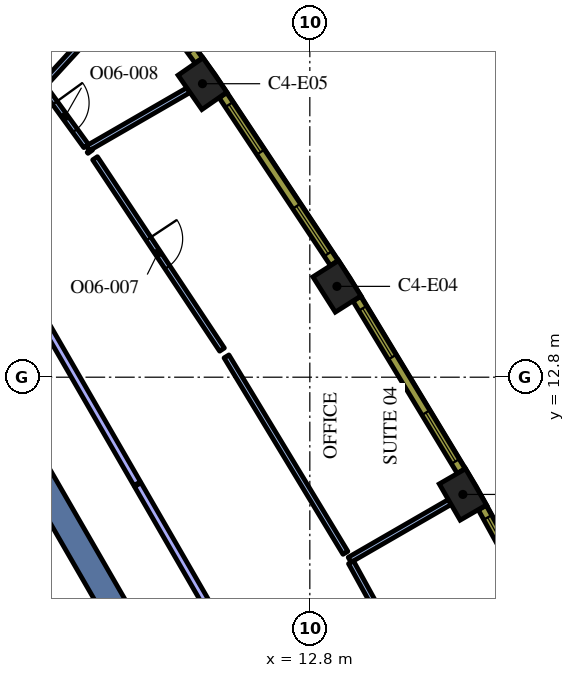
"""IFC4 building model, lengths in metres.
Left out: names, types, materials, properties, quantities, classifications, styles, units other than length and angle.
Written with IfcOpenShell. Run it as: python <this file> out.ifc"""

import sys

from ifc_helpers import new_model, si_unit, direction, frame, frame_2d, origin, origin_2d, place, context, subcontext, project, spatial, polyline, rectangle, outline, extrude, element, fill, save


model = new_model("IFC4")
c1 = context("Model", 3, precision=1e-05, world=origin(), true_north=direction((0.0, 1.0)))
c2 = subcontext(c1, "Body", "Model", "MODEL_VIEW")
j1 = project(units=[si_unit("LENGTHUNIT", "METRE"), si_unit("PLANEANGLEUNIT", "RADIAN")], contexts=[c1])
p1 = place(None, origin())
s1 = spatial("IfcSite", under=j1, at=p1, CompositionType="ELEMENT")
p2 = place(p1, origin())
s2 = spatial("IfcBuilding", under=s1, at=p2, CompositionType="ELEMENT")
p3 = place(p2, frame((0.0, 0.0, 205.8)))
s3 = spatial("IfcBuildingStorey", under=s2, at=p3, CompositionType="ELEMENT", Elevation=205.8)
for number, where, z_axis, x_axis in (
    (1, (16.827, 9.715, 0.0), (0.0, 0.0, 1.0), (-0.5, 0.866, 0.0)),
    (2, (13.513, 15.19, 0.0), (0.0, 0.0, 1.0), (-0.536, 0.845, 0.0)),
    (3, (9.975, 20.522, 0.0), (0.0, 0.0, 1.0), (-0.57, 0.822, 0.0)),
):
    element("IfcColumn", number, at=place(p3, frame(where, z_axis=z_axis, x_axis=x_axis)), inside=s3, PredefinedType="COLUMN", context=c2, shape_type="SweptSolid", body=[
        extrude(rectangle(XDim=1.1, YDim=0.8, at=origin_2d()), origin(), (0.0, 0.0, 1.0), 4.2),
    ])
p4 = place(p3, frame((8.235, 5.736, 0.0), z_axis=(0.0, 0.0, 1.0), x_axis=(-0.499983401189, 0.8660349869, 0.0)))
e4 = element("IfcWall", 4, at=p4, inside=s3, PredefinedType="SOLIDWALL", context=c2, shape_type="SweptSolid", body=[
    extrude(rectangle(XDim=12.472, YDim=0.7, at=frame_2d((6.236, 0.0))), origin(), (0.0, 0.0, 1.0), 4.2),
])
p5 = place(p3, origin())
e5 = element("IfcWall", 5, at=p5, inside=s3, PredefinedType="SOLIDWALL", context=c2, shape_type="SweptSolid", body=[
    extrude(outline(polyline([(0.332, 6.925), (0.335, 6.925), (0.335, 6.925), (0.335, 6.925), (0.335, 7.075), (0.335, 7.075), (0.335, 7.075), (0.245, 7.075), (0.035, 7.439), (0.252, 7.564), (0.377, 7.348), (1.512, 5.382), (1.637, 5.165), (2.221, 4.153), (2.771, 3.199), (2.896, 2.983), (3.138, 2.564), (4.031, 1.017), (4.156, 0.801), (5.292, -1.165), (5.417, -1.382), (6.073, -2.519), (6.552, -3.348), (6.677, -3.564), (6.46, -3.689), (0.332, 6.925)])), origin(), (0.0, 0.0, 1.0), 4.2),
])
p6 = place(p3, frame((8.565, -2.185, 0.0), z_axis=(0.0, 0.0, 1.0), x_axis=(-0.499997954832, 0.866026584559, 0.0)))
e6 = element("IfcWall", 6, at=p6, inside=s3, PredefinedType="SOLIDWALL", context=c2, shape_type="SweptSolid", body=[
    extrude(rectangle(XDim=12.35, YDim=0.25, at=frame_2d((6.175, 0.0))), origin(), (0.0, 0.0, 1.0), 4.2),
])
p7 = place(p6, frame((0.585, 0.0, 0.0)))
e7 = element("IfcOpeningElement", 7, at=p7, cuts=e6, PredefinedType="OPENING", context=c2, shape_type="SweptSolid", body=[
    extrude(rectangle(XDim=1.1, YDim=2.1, at=frame_2d((0.55, 1.05))), frame((0.0, 0.135, 0.0), z_axis=(0.0, -1.0, 0.0), x_axis=(1.0, 0.0, 0.0)), (0.0, 0.0, 1.0), 0.27),
])
p8 = place(p3, frame((13.848, 7.995, 0.0), z_axis=(0.0, 0.0, 1.0), x_axis=(0.86603583403, 0.49998193385, 0.0)))
e8 = element("IfcWall", 8, at=p8, inside=s3, PredefinedType="PARTITIONING", context=c2, shape_type="SweptSolid", body=[
    extrude(rectangle(XDim=3.041, YDim=0.15, at=frame_2d((1.52, 0.0))), origin(), (0.0, 0.0, 1.0), 3.45),
])
p9 = place(p3, frame((16.76, 2.7, 0.0), z_axis=(0.0, 0.0, 1.0), x_axis=(-0.481907755985, 0.876221955169, 0.0)))
e9 = element("IfcWall", 9, at=p9, inside=s3, PredefinedType="PARTITIONING", context=c2, shape_type="SweptSolid", body=[
    extrude(rectangle(XDim=5.967, YDim=0.15, at=frame_2d((2.984, 0.0))), origin(), (0.0, 0.0, 1.0), 3.45),
])
p10 = place(p3, frame((6.958, 18.823, 0.0), z_axis=(0.0, 0.0, 1.0), x_axis=(0.866008752819, 0.500028839209, 0.0)))
e10 = element("IfcWall", 10, at=p10, inside=s3, PredefinedType="PARTITIONING", context=c2, shape_type="SweptSolid", body=[
    extrude(rectangle(XDim=3.058, YDim=0.15, at=frame_2d((1.529, 0.0))), origin(), (0.0, 0.0, 1.0), 3.45),
])
p11 = place(p3, frame((13.737, 8.178, 0.0), z_axis=(0.0, 0.0, 1.0), x_axis=(-0.517884383874, 0.855450620983, 0.0)))
e11 = element("IfcWall", 11, at=p11, inside=s3, PredefinedType="PARTITIONING", context=c2, shape_type="SweptSolid", body=[
    extrude(rectangle(XDim=6.043, YDim=0.15, at=frame_2d((3.021, 0.0))), origin(), (0.0, 0.0, 1.0), 3.45),
])
p12 = place(p3, frame((7.148, 18.561, 0.0), z_axis=(0.0, 0.0, 1.0), x_axis=(0.552890023891, -0.833254235802, 0.0)))
e12 = element("IfcWall", 12, at=p12, inside=s3, PredefinedType="PARTITIONING", context=c2, shape_type="SweptSolid", body=[
    extrude(rectangle(XDim=6.042, YDim=0.15, at=frame_2d((3.021, 0.0))), origin(), (0.0, 0.0, 1.0), 3.45),
])
p13 = place(p12, frame((2.542, 0.0, 0.0)))
e13 = element("IfcOpeningElement", 13, at=p13, cuts=e12, PredefinedType="OPENING", context=c2, shape_type="SweptSolid", body=[
    extrude(rectangle(XDim=0.9, YDim=2.1, at=frame_2d((0.45, 1.05))), frame((0.0, 0.085, 0.0), z_axis=(0.0, -1.0, 0.0), x_axis=(1.0, 0.0, 0.0)), (0.0, 0.0, 1.0), 0.17),
])
p14 = place(p3, frame((7.022, 18.734, 0.0), z_axis=(0.0, 0.0, 1.0), x_axis=(-0.585233084123, 0.810865116556, 0.0)))
e14 = element("IfcWall", 14, at=p14, inside=s3, PredefinedType="PARTITIONING", context=c2, shape_type="SweptSolid", body=[
    extrude(rectangle(XDim=0.035, YDim=0.15, at=frame_2d((0.017, 0.0))), origin(), (0.0, 0.0, 1.0), 3.45),
])
p15 = place(p3, frame((5.764, 20.469, 0.0), z_axis=(0.0, 0.0, 1.0), x_axis=(0.586969615341, -0.809608961577, 0.0)))
e15 = element("IfcWall", 15, at=p15, inside=s3, PredefinedType="PARTITIONING", context=c2, shape_type="SweptSolid", body=[
    extrude(rectangle(XDim=1.957, YDim=0.15, at=frame_2d((0.979, 0.0))), origin(), (0.0, 0.0, 1.0), 3.45),
])
p16 = place(p15, frame((0.558, 0.0, 0.0)))
e16 = element("IfcOpeningElement", 16, at=p16, cuts=e15, PredefinedType="OPENING", context=c2, shape_type="SweptSolid", body=[
    extrude(rectangle(XDim=0.9, YDim=2.1, at=frame_2d((0.45, 1.05))), frame((0.0, 0.085, 0.0), z_axis=(0.0, -1.0, 0.0), x_axis=(1.0, 0.0, 0.0)), (0.0, 0.0, 1.0), 0.17),
])
p17 = place(p3, frame((5.816, 20.526, 0.0), z_axis=(0.0, 0.0, 1.0), x_axis=(0.675700046709, 0.737176672771, 0.0)))
e17 = element("IfcWall", 17, at=p17, inside=s3, PredefinedType="PARTITIONING", context=c2, shape_type="SweptSolid", body=[
    extrude(rectangle(XDim=3.598, YDim=0.15, at=frame_2d((1.799, 0.0))), origin(), (0.0, 0.0, 1.0), 3.45),
])
p18 = place(p3, frame((12.772, 2.178, 0.0), z_axis=(0.0, 0.0, 1.0), x_axis=(-0.5000018851, 0.866024315419, 0.0)))
e18 = element("IfcWall", 18, at=p18, inside=s3, PredefinedType="PARTITIONING", context=c2, shape_type="SweptSolid", body=[
    extrude(rectangle(XDim=9.0, YDim=0.2, at=frame_2d((4.5, 0.0))), origin(), (0.0, 0.0, 1.0), 3.45),
])
p19 = place(p3, frame((8.257, 9.998, 0.0), z_axis=(0.0, 0.0, 1.0), x_axis=(-0.499998405424, 0.866026324412, 0.0)))
e19 = element("IfcWall", 19, at=p19, inside=s3, PredefinedType="PARTITIONING", context=c2, shape_type="SweptSolid", body=[
    extrude(rectangle(XDim=9.267, YDim=0.2, at=frame_2d((4.633, 0.0))), origin(), (0.0, 0.0, 1.0), 3.45),
])
p20 = place(p3, frame((19.892, 4.725, 0.0), z_axis=(0.0, 0.0, 1.0), x_axis=(-0.481925825015, 0.876212017256, 0.0)))
e20 = element("IfcWall", 20, at=p20, inside=s3, PredefinedType="SOLIDWALL", context=c2, shape_type="SweptSolid", body=[
    extrude(rectangle(XDim=5.299, YDim=0.24, at=frame_2d((2.649, 0.0))), origin(), (0.0, 0.0, 1.0), 3.95),
])
p21 = place(p20, frame((0.295, 0.0, 0.9)))
e21 = element("IfcOpeningElement", 21, at=p21, cuts=e20, PredefinedType="OPENING", context=c2, shape_type="SweptSolid", body=[
    extrude(rectangle(XDim=1.5, YDim=2.55, at=frame_2d((0.75, 1.275))), frame((0.0, 0.13, 0.0), z_axis=(0.0, -1.0, 0.0), x_axis=(1.0, 0.0, 0.0)), (0.0, 0.0, 1.0), 0.26),
])
p22 = place(p20, frame((3.504, 0.0, 0.9)))
e22 = element("IfcOpeningElement", 22, at=p22, cuts=e20, PredefinedType="OPENING", context=c2, shape_type="SweptSolid", body=[
    extrude(rectangle(XDim=1.5, YDim=2.55, at=frame_2d((0.75, 1.275))), frame((0.0, 0.13, 0.0), z_axis=(0.0, -1.0, 0.0), x_axis=(1.0, 0.0, 0.0)), (0.0, 0.0, 1.0), 0.26),
])
p23 = place(p3, frame((16.782, 10.331, 0.0), z_axis=(0.0, 0.0, 1.0), x_axis=(-0.517846166225, 0.855473756538, 0.0)))
e23 = element("IfcWall", 23, at=p23, inside=s3, PredefinedType="SOLIDWALL", context=c2, shape_type="SweptSolid", body=[
    extrude(rectangle(XDim=5.298, YDim=0.24, at=frame_2d((2.649, 0.0))), origin(), (0.0, 0.0, 1.0), 3.95),
])
p24 = place(p23, frame((0.294, 0.0, 0.9)))
e24 = element("IfcOpeningElement", 24, at=p24, cuts=e23, PredefinedType="OPENING", context=c2, shape_type="SweptSolid", body=[
    extrude(rectangle(XDim=1.5, YDim=2.55, at=frame_2d((0.75, 1.275))), frame((0.0, 0.13, 0.0), z_axis=(0.0, -1.0, 0.0), x_axis=(1.0, 0.0, 0.0)), (0.0, 0.0, 1.0), 0.26),
])
p25 = place(p23, frame((3.504, 0.0, 0.9)))
e25 = element("IfcOpeningElement", 25, at=p25, cuts=e23, PredefinedType="OPENING", context=c2, shape_type="SweptSolid", body=[
    extrude(rectangle(XDim=1.5, YDim=2.55, at=frame_2d((0.75, 1.275))), frame((0.0, 0.13, 0.0), z_axis=(0.0, -1.0, 0.0), x_axis=(1.0, 0.0, 0.0)), (0.0, 0.0, 1.0), 0.26),
])
p26 = place(p3, frame((13.442, 15.803, 0.0), z_axis=(0.0, 0.0, 1.0), x_axis=(-0.552901821755, 0.833246407433, 0.0)))
e26 = element("IfcWall", 26, at=p26, inside=s3, PredefinedType="SOLIDWALL", context=c2, shape_type="SweptSolid", body=[
    extrude(rectangle(XDim=5.298, YDim=0.24, at=frame_2d((2.649, 0.0))), origin(), (0.0, 0.0, 1.0), 3.95),
])
p27 = place(p26, frame((0.295, 0.0, 0.9)))
e27 = element("IfcOpeningElement", 27, at=p27, cuts=e26, PredefinedType="OPENING", context=c2, shape_type="SweptSolid", body=[
    extrude(rectangle(XDim=1.5, YDim=2.55, at=frame_2d((0.75, 1.275))), frame((0.0, 0.13, 0.0), z_axis=(0.0, -1.0, 0.0), x_axis=(1.0, 0.0, 0.0)), (0.0, 0.0, 1.0), 0.26),
])
p28 = place(p26, frame((3.504, 0.0, 0.9)))
e28 = element("IfcOpeningElement", 28, at=p28, cuts=e26, PredefinedType="OPENING", context=c2, shape_type="SweptSolid", body=[
    extrude(rectangle(XDim=1.5, YDim=2.55, at=frame_2d((0.75, 1.275))), frame((0.0, 0.13, 0.0), z_axis=(0.0, -1.0, 0.0), x_axis=(1.0, 0.0, 0.0)), (0.0, 0.0, 1.0), 0.26),
])
p29 = place(p3, frame((9.878, 21.132, 0.0), z_axis=(0.0, 0.0, 1.0), x_axis=(-0.586998456641, 0.80958805074, 0.0)))
e29 = element("IfcWall", 29, at=p29, inside=s3, PredefinedType="SOLIDWALL", context=c2, shape_type="SweptSolid", body=[
    extrude(rectangle(XDim=5.311, YDim=0.24, at=frame_2d((2.655, 0.0))), origin(), (0.0, 0.0, 1.0), 3.95),
])
p30 = place(p29, frame((0.306, 0.0, 0.9)))
e30 = element("IfcOpeningElement", 30, at=p30, cuts=e29, PredefinedType="OPENING", context=c2, shape_type="SweptSolid", body=[
    extrude(rectangle(XDim=1.5, YDim=2.55, at=frame_2d((0.75, 1.275))), frame((0.0, 0.13, 0.0), z_axis=(0.0, -1.0, 0.0), x_axis=(1.0, 0.0, 0.0)), (0.0, 0.0, 1.0), 0.26),
])
p31 = place(p29, frame((3.539, 0.0, 0.9)))
e31 = element("IfcOpeningElement", 31, at=p31, cuts=e29, PredefinedType="OPENING", context=c2, shape_type="SweptSolid", body=[
    extrude(rectangle(XDim=1.5, YDim=2.55, at=frame_2d((0.75, 1.275))), frame((0.0, 0.13, 0.0), z_axis=(0.0, -1.0, 0.0), x_axis=(1.0, 0.0, 0.0)), (0.0, 0.0, 1.0), 0.26),
])
p32 = place(p13, origin())
e32 = element("IfcDoor", 32, at=p32, inside=s3, OperationType="SINGLE_SWING_LEFT", PredefinedType="DOOR", context=c2, shape_type="SweptSolid", body=[
    extrude(rectangle(XDim=0.9, YDim=2.1, at=frame_2d((0.45, 1.05))), frame((0.0, 0.025, 0.0), z_axis=(0.0, -1.0, 0.0), x_axis=(1.0, 0.0, 0.0)), (0.0, 0.0, 1.0), 0.05),
])
fill(e13, e32)
p33 = place(p16, origin())
e33 = element("IfcDoor", 33, at=p33, inside=s3, OperationType="SINGLE_SWING_RIGHT", PredefinedType="DOOR", context=c2, shape_type="SweptSolid", body=[
    extrude(rectangle(XDim=0.9, YDim=2.1, at=frame_2d((0.45, 1.05))), frame((0.0, 0.025, 0.0), z_axis=(0.0, -1.0, 0.0), x_axis=(1.0, 0.0, 0.0)), (0.0, 0.0, 1.0), 0.05),
])
fill(e16, e33)
p34 = place(p22, origin())
e34 = element("IfcWindow", 34, at=p34, inside=s3, PartitioningType="SINGLE_PANEL", PredefinedType="WINDOW", context=c2, shape_type="SweptSolid", body=[
    extrude(rectangle(XDim=1.5, YDim=2.55, at=frame_2d((0.75, 1.275))), frame((0.0, 0.04, 0.0), z_axis=(0.0, -1.0, 0.0), x_axis=(1.0, 0.0, 0.0)), (0.0, 0.0, 1.0), 0.06),
])
fill(e22, e34)
p35 = place(p24, origin())
e35 = element("IfcWindow", 35, at=p35, inside=s3, PartitioningType="SINGLE_PANEL", PredefinedType="WINDOW", context=c2, shape_type="SweptSolid", body=[
    extrude(rectangle(XDim=1.5, YDim=2.55, at=frame_2d((0.75, 1.275))), frame((0.0, 0.04, 0.0), z_axis=(0.0, -1.0, 0.0), x_axis=(1.0, 0.0, 0.0)), (0.0, 0.0, 1.0), 0.06),
])
fill(e24, e35)
p36 = place(p25, origin())
e36 = element("IfcWindow", 36, at=p36, inside=s3, PartitioningType="SINGLE_PANEL", PredefinedType="WINDOW", context=c2, shape_type="SweptSolid", body=[
    extrude(rectangle(XDim=1.5, YDim=2.55, at=frame_2d((0.75, 1.275))), frame((0.0, 0.04, 0.0), z_axis=(0.0, -1.0, 0.0), x_axis=(1.0, 0.0, 0.0)), (0.0, 0.0, 1.0), 0.06),
])
fill(e25, e36)
p37 = place(p27, origin())
e37 = element("IfcWindow", 37, at=p37, inside=s3, PartitioningType="SINGLE_PANEL", PredefinedType="WINDOW", context=c2, shape_type="SweptSolid", body=[
    extrude(rectangle(XDim=1.5, YDim=2.55, at=frame_2d((0.75, 1.275))), frame((0.0, 0.04, 0.0), z_axis=(0.0, -1.0, 0.0), x_axis=(1.0, 0.0, 0.0)), (0.0, 0.0, 1.0), 0.06),
])
fill(e27, e37)
p38 = place(p28, origin())
e38 = element("IfcWindow", 38, at=p38, inside=s3, PartitioningType="SINGLE_PANEL", PredefinedType="WINDOW", context=c2, shape_type="SweptSolid", body=[
    extrude(rectangle(XDim=1.5, YDim=2.55, at=frame_2d((0.75, 1.275))), frame((0.0, 0.04, 0.0), z_axis=(0.0, -1.0, 0.0), x_axis=(1.0, 0.0, 0.0)), (0.0, 0.0, 1.0), 0.06),
])
fill(e28, e38)
save(model, sys.argv[1])
